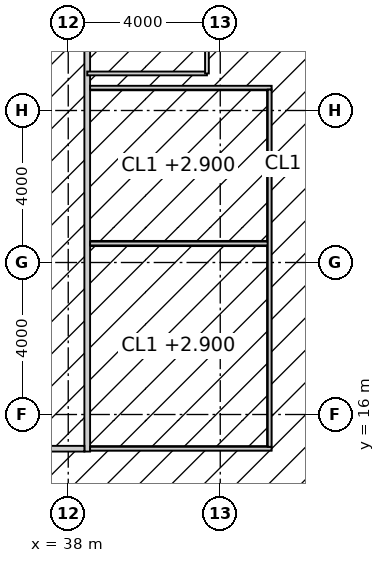
"""IFC4 building model, lengths in metres.
Left out: names, types, materials, properties, quantities, classifications, styles, units other than length and angle.
Written with IfcOpenShell. Run it as: python <this file> out.ifc"""

import sys

from ifc_helpers import new_model, si_unit, direction, frame, frame_2d, origin, place, context, subcontext, project, spatial, rectangle, extrude, element, fill, save


model = new_model("IFC4")
c1 = context("Model", 3, precision=1e-05, world=origin(), true_north=direction((0.0, 1.0)))
c2 = subcontext(c1, "Body", "Model", "MODEL_VIEW")
j1 = project(units=[si_unit("LENGTHUNIT", "METRE"), si_unit("PLANEANGLEUNIT", "RADIAN")], contexts=[c1])
p1 = place(None, origin())
s1 = spatial("IfcSite", under=j1, at=p1, CompositionType="ELEMENT")
p2 = place(p1, origin())
s2 = spatial("IfcBuilding", under=s1, at=p2, CompositionType="ELEMENT")
p3 = place(p2, frame((0.0, 0.0, 286.2)))
s3 = spatial("IfcBuildingStorey", under=s2, at=p3, CompositionType="ELEMENT", Elevation=286.2)
p4 = place(p3, frame((38.5, 15.025, 0.0), z_axis=(0.0, 0.0, 1.0), x_axis=(0.0, 1.0, 0.0)))
e1 = element("IfcWall", 1, at=p4, inside=s3, PredefinedType="PARTITIONING", context=c2, shape_type="SweptSolid", body=[
    extrude(rectangle(XDim=23.35, YDim=0.15, at=frame_2d((11.675, 0.0))), origin(), (0.0, 0.0, 1.0), 3.85),
])
p5 = place(p4, frame((10.775, 0.0, 0.0)))
e2 = element("IfcOpeningElement", 2, at=p5, cuts=e1, PredefinedType="OPENING", context=c2, shape_type="SweptSolid", body=[
    extrude(rectangle(XDim=1.8, YDim=2.4, at=frame_2d((0.9, 1.2))), frame((0.0, 0.085, 0.0), z_axis=(0.0, -1.0, 0.0), x_axis=(1.0, 0.0, 0.0)), (0.0, 0.0, 1.0), 0.17),
])
p6 = place(p3, frame((15.775, 15.1, 0.0), z_axis=(0.0, 0.0, 1.0), x_axis=(1.0, 0.0, 0.0)))
e3 = element("IfcWall", 3, at=p6, inside=s3, PredefinedType="PARTITIONING", context=c2, shape_type="SweptSolid", body=[
    extrude(rectangle(XDim=22.65, YDim=0.15, at=frame_2d((11.325, 0.0))), origin(), (0.0, 0.0, 1.0), 3.85),
])
p7 = place(p3, frame((38.575, 15.1, 0.0), z_axis=(0.0, 0.0, 1.0), x_axis=(1.0, 0.0, 0.0)))
e4 = element("IfcWall", 4, at=p7, inside=s3, PredefinedType="PARTITIONING", context=c2, shape_type="SweptSolid", body=[
    extrude(rectangle(XDim=4.775, YDim=0.1, at=frame_2d((2.388, 0.0))), origin(), (0.0, 0.0, 1.0), 3.85),
])
p8 = place(p3, frame((38.575, 20.5, 0.0), z_axis=(0.0, 0.0, 1.0), x_axis=(1.0, 0.0, 0.0)))
e5 = element("IfcWall", 5, at=p8, inside=s3, PredefinedType="PARTITIONING", context=c2, shape_type="SweptSolid", body=[
    extrude(rectangle(XDim=4.675, YDim=0.1, at=frame_2d((2.337, 0.0))), origin(), (0.0, 0.0, 1.0), 3.85),
])
p9 = place(p3, frame((38.575, 24.6, 0.0), z_axis=(0.0, 0.0, 1.0), x_axis=(1.0, 0.0, 0.0)))
e6 = element("IfcWall", 6, at=p9, inside=s3, PredefinedType="PARTITIONING", context=c2, shape_type="SweptSolid", body=[
    extrude(rectangle(XDim=4.775, YDim=0.1, at=frame_2d((2.388, 0.0))), origin(), (0.0, 0.0, 1.0), 3.85),
])
p10 = place(p3, frame((43.3, 15.15, 0.0), z_axis=(0.0, 0.0, 1.0), x_axis=(0.0, 1.0, 0.0)))
e7 = element("IfcWall", 7, at=p10, inside=s3, PredefinedType="PARTITIONING", context=c2, shape_type="SweptSolid", body=[
    extrude(rectangle(XDim=9.4, YDim=0.1, at=frame_2d((4.7, 0.0))), origin(), (0.0, 0.0, 1.0), 3.85),
])
p11 = place(p10, frame((2.15, 0.0, 0.0)))
e8 = element("IfcOpeningElement", 8, at=p11, cuts=e7, PredefinedType="OPENING", context=c2, shape_type="SweptSolid", body=[
    extrude(rectangle(XDim=1.0, YDim=2.2, at=frame_2d((0.5, 1.1))), frame((0.0, 0.06, 0.0), z_axis=(0.0, -1.0, 0.0), x_axis=(1.0, 0.0, 0.0)), (0.0, 0.0, 1.0), 0.12),
])
p12 = place(p10, frame((6.9, 0.0, 0.0)))
e9 = element("IfcOpeningElement", 9, at=p12, cuts=e7, PredefinedType="OPENING", context=c2, shape_type="SweptSolid", body=[
    extrude(rectangle(XDim=1.0, YDim=2.2, at=frame_2d((0.5, 1.1))), frame((0.0, 0.06, 0.0), z_axis=(0.0, -1.0, 0.0), x_axis=(1.0, 0.0, 0.0)), (0.0, 0.0, 1.0), 0.12),
])
p13 = place(p3, frame((38.5, 24.975, 0.0), z_axis=(0.0, 0.0, 1.0), x_axis=(1.0, 0.0, 0.0)))
e10 = element("IfcWall", 10, at=p13, inside=s3, PredefinedType="PARTITIONING", context=c2, shape_type="SweptSolid", body=[
    extrude(rectangle(XDim=3.15, YDim=0.1, at=frame_2d((1.575, 0.0))), origin(), (0.0, 0.0, 1.0), 3.85),
])
p14 = place(p3, frame((41.65, 24.975, 0.0), z_axis=(0.0, 0.0, 1.0), x_axis=(0.0, 1.0, 0.0)))
e11 = element("IfcWall", 11, at=p14, inside=s3, PredefinedType="PARTITIONING", context=c2, shape_type="SweptSolid", body=[
    extrude(rectangle(XDim=3.45, YDim=0.1, at=frame_2d((1.725, 0.0))), origin(), (0.0, 0.0, 1.0), 3.85),
])
p15 = place(p14, frame((1.225, 0.0, 0.0)))
e12 = element("IfcOpeningElement", 12, at=p15, cuts=e11, PredefinedType="OPENING", context=c2, shape_type="SweptSolid", body=[
    extrude(rectangle(XDim=1.0, YDim=2.2, at=frame_2d((0.5, 1.1))), frame((0.0, 0.06, 0.0), z_axis=(0.0, -1.0, 0.0), x_axis=(1.0, 0.0, 0.0)), (0.0, 0.0, 1.0), 0.12),
])
p16 = place(p11, origin())
e13 = element("IfcDoor", 13, at=p16, inside=s3, OperationType="SINGLE_SWING_RIGHT", PredefinedType="DOOR", context=c2, shape_type="SweptSolid", body=[
    extrude(rectangle(XDim=1.0, YDim=2.2, at=frame_2d((0.5, 1.1))), frame((0.0, 0.025, 0.0), z_axis=(0.0, -1.0, 0.0), x_axis=(1.0, 0.0, 0.0)), (0.0, 0.0, 1.0), 0.05),
])
fill(e8, e13)
p17 = place(p12, origin())
e14 = element("IfcDoor", 14, at=p17, inside=s3, OperationType="SINGLE_SWING_LEFT", PredefinedType="DOOR", context=c2, shape_type="SweptSolid", body=[
    extrude(rectangle(XDim=1.0, YDim=2.2, at=frame_2d((0.5, 1.1))), frame((0.0, 0.025, 0.0), z_axis=(0.0, -1.0, 0.0), x_axis=(1.0, 0.0, 0.0)), (0.0, 0.0, 1.0), 0.05),
])
fill(e9, e14)
save(model, sys.argv[1])
